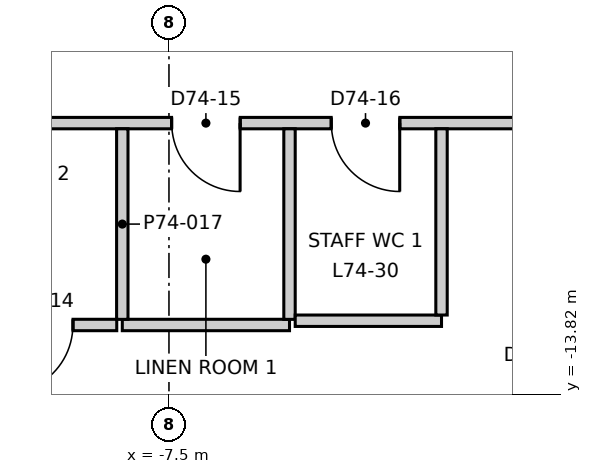
"""IFC4 building model, lengths in metres.
Left out: names, types, materials, properties, quantities, classifications, styles, units other than length and angle.
Written with IfcOpenShell. Run it as: python <this file> out.ifc"""

import sys

from ifc_helpers import new_model, si_unit, direction, frame, frame_2d, origin, place, context, subcontext, project, spatial, rectangle, extrude, element, fill, save


model = new_model("IFC4")
c1 = context("Model", 3, precision=1e-05, world=origin(), true_north=direction((0.0, 1.0)))
c2 = subcontext(c1, "Body", "Model", "MODEL_VIEW")
j1 = project(units=[si_unit("LENGTHUNIT", "METRE"), si_unit("PLANEANGLEUNIT", "RADIAN")], contexts=[c1])
p1 = place(None, origin())
s1 = spatial("IfcSite", under=j1, at=p1, CompositionType="ELEMENT")
p2 = place(p1, origin())
s2 = spatial("IfcBuilding", under=s1, at=p2, CompositionType="ELEMENT")
p3 = place(p2, frame((0.0, 0.0, 311.5)))
s3 = spatial("IfcBuildingStorey", under=s2, at=p3, CompositionType="ELEMENT", Elevation=311.5)
p4 = place(p3, frame((-2.412, 26.948, 0.0), z_axis=(0.0, 0.0, 1.0), x_axis=(-0.500002044679, -0.866024223285, 0.0)))
e1 = element("IfcWall", 1, at=p4, inside=s3, PredefinedType="ELEMENTEDWALL", context=c2, shape_type="SweptSolid", body=[
    extrude(rectangle(XDim=44.243, YDim=0.2, at=frame_2d((22.122, 0.0))), origin(), (0.0, 0.0, 1.0), 3.3),
])
p5 = place(p4, frame((2.056, 0.0, 0.9)))
e2 = element("IfcOpeningElement", 2, at=p5, cuts=e1, PredefinedType="OPENING", context=c2, shape_type="SweptSolid", body=[
    extrude(rectangle(XDim=3.7, YDim=2.2, at=frame_2d((1.85, 1.1))), frame((0.0, 0.11, 0.0), z_axis=(0.0, -1.0, 0.0), x_axis=(1.0, 0.0, 0.0)), (0.0, 0.0, 1.0), 0.22),
])
p6 = place(p4, frame((7.263, 0.0, 0.9)))
e3 = element("IfcOpeningElement", 3, at=p6, cuts=e1, PredefinedType="OPENING", context=c2, shape_type="SweptSolid", body=[
    extrude(rectangle(XDim=3.7, YDim=2.2, at=frame_2d((1.85, 1.1))), frame((0.0, 0.11, 0.0), z_axis=(0.0, -1.0, 0.0), x_axis=(1.0, 0.0, 0.0)), (0.0, 0.0, 1.0), 0.22),
])
p7 = place(p4, frame((12.471, 0.0, 0.9)))
e4 = element("IfcOpeningElement", 4, at=p7, cuts=e1, PredefinedType="OPENING", context=c2, shape_type="SweptSolid", body=[
    extrude(rectangle(XDim=3.7, YDim=2.2, at=frame_2d((1.85, 1.1))), frame((0.0, 0.11, 0.0), z_axis=(0.0, -1.0, 0.0), x_axis=(1.0, 0.0, 0.0)), (0.0, 0.0, 1.0), 0.22),
])
p8 = place(p4, frame((17.678, 0.0, 0.9)))
e5 = element("IfcOpeningElement", 5, at=p8, cuts=e1, PredefinedType="OPENING", context=c2, shape_type="SweptSolid", body=[
    extrude(rectangle(XDim=3.7, YDim=2.2, at=frame_2d((1.85, 1.1))), frame((0.0, 0.11, 0.0), z_axis=(0.0, -1.0, 0.0), x_axis=(1.0, 0.0, 0.0)), (0.0, 0.0, 1.0), 0.22),
])
p9 = place(p4, frame((22.885, 0.0, 0.9)))
e6 = element("IfcOpeningElement", 6, at=p9, cuts=e1, PredefinedType="OPENING", context=c2, shape_type="SweptSolid", body=[
    extrude(rectangle(XDim=3.7, YDim=2.2, at=frame_2d((1.85, 1.1))), frame((0.0, 0.11, 0.0), z_axis=(0.0, -1.0, 0.0), x_axis=(1.0, 0.0, 0.0)), (0.0, 0.0, 1.0), 0.22),
])
p10 = place(p4, frame((28.092, 0.0, 0.9)))
e7 = element("IfcOpeningElement", 7, at=p10, cuts=e1, PredefinedType="OPENING", context=c2, shape_type="SweptSolid", body=[
    extrude(rectangle(XDim=3.7, YDim=2.2, at=frame_2d((1.85, 1.1))), frame((0.0, 0.11, 0.0), z_axis=(0.0, -1.0, 0.0), x_axis=(1.0, 0.0, 0.0)), (0.0, 0.0, 1.0), 0.22),
])
p11 = place(p4, frame((33.3, 0.0, 0.9)))
e8 = element("IfcOpeningElement", 8, at=p11, cuts=e1, PredefinedType="OPENING", context=c2, shape_type="SweptSolid", body=[
    extrude(rectangle(XDim=3.7, YDim=2.2, at=frame_2d((1.85, 1.1))), frame((0.0, 0.11, 0.0), z_axis=(0.0, -1.0, 0.0), x_axis=(1.0, 0.0, 0.0)), (0.0, 0.0, 1.0), 0.22),
])
p12 = place(p4, frame((38.507, 0.0, 0.9)))
e9 = element("IfcOpeningElement", 9, at=p12, cuts=e1, PredefinedType="OPENING", context=c2, shape_type="SweptSolid", body=[
    extrude(rectangle(XDim=3.7, YDim=2.2, at=frame_2d((1.85, 1.1))), frame((0.0, 0.11, 0.0), z_axis=(0.0, -1.0, 0.0), x_axis=(1.0, 0.0, 0.0)), (0.0, 0.0, 1.0), 0.22),
])
p13 = place(p3, frame((-17.678, -10.12, 0.0), z_axis=(0.0, 0.0, 1.0), x_axis=(0.49998824015, 0.86603219323, 0.0)))
e10 = element("IfcWall", 10, at=p13, inside=s3, PredefinedType="PARTITIONING", context=c2, shape_type="SweptSolid", body=[
    extrude(rectangle(XDim=35.357, YDim=0.15, at=frame_2d((17.678, 0.0))), origin(), (0.0, 0.0, 1.0), 3.3),
])
p14 = place(p13, frame((28.607, 0.0, 0.0)))
e11 = element("IfcOpeningElement", 11, at=p14, cuts=e10, PredefinedType="OPENING", context=c2, shape_type="SweptSolid", body=[
    extrude(rectangle(XDim=1.0, YDim=2.1, at=frame_2d((0.5, 1.05))), frame((0.0, 0.085, 0.0), z_axis=(0.0, -1.0, 0.0), x_axis=(1.0, 0.0, 0.0)), (0.0, 0.0, 1.0), 0.17),
])
p15 = place(p13, frame((13.86, 0.0, 0.0)))
e12 = element("IfcOpeningElement", 12, at=p15, cuts=e10, PredefinedType="OPENING", context=c2, shape_type="SweptSolid", body=[
    extrude(rectangle(XDim=1.0, YDim=2.1, at=frame_2d((0.5, 1.05))), frame((0.0, 0.085, 0.0), z_axis=(0.0, -1.0, 0.0), x_axis=(1.0, 0.0, 0.0)), (0.0, 0.0, 1.0), 0.17),
])
p16 = place(p13, frame((18.96, 0.0, 0.0)))
e13 = element("IfcOpeningElement", 13, at=p16, cuts=e10, PredefinedType="OPENING", context=c2, shape_type="SweptSolid", body=[
    extrude(rectangle(XDim=0.9, YDim=2.1, at=frame_2d((0.45, 1.05))), frame((0.0, 0.085, 0.0), z_axis=(0.0, -1.0, 0.0), x_axis=(1.0, 0.0, 0.0)), (0.0, 0.0, 1.0), 0.17),
])
p17 = place(p13, frame((16.86, 0.0, 0.0)))
e14 = element("IfcOpeningElement", 14, at=p17, cuts=e10, PredefinedType="OPENING", context=c2, shape_type="SweptSolid", body=[
    extrude(rectangle(XDim=0.9, YDim=2.1, at=frame_2d((0.45, 1.05))), frame((0.0, 0.085, 0.0), z_axis=(0.0, -1.0, 0.0), x_axis=(1.0, 0.0, 0.0)), (0.0, 0.0, 1.0), 0.17),
])
p18 = place(p13, frame((8.146, 0.0, 0.0)))
e15 = element("IfcOpeningElement", 15, at=p18, cuts=e10, PredefinedType="OPENING", context=c2, shape_type="SweptSolid", body=[
    extrude(rectangle(XDim=1.0, YDim=2.1, at=frame_2d((0.5, 1.05))), frame((0.0, 0.085, 0.0), z_axis=(0.0, -1.0, 0.0), x_axis=(1.0, 0.0, 0.0)), (0.0, 0.0, 1.0), 0.17),
])
p19 = place(p13, frame((3.038, 0.0, 0.0)))
e16 = element("IfcOpeningElement", 16, at=p19, cuts=e10, PredefinedType="OPENING", context=c2, shape_type="SweptSolid", body=[
    extrude(rectangle(XDim=1.0, YDim=2.1, at=frame_2d((0.5, 1.05))), frame((0.0, 0.085, 0.0), z_axis=(0.0, -1.0, 0.0), x_axis=(1.0, 0.0, 0.0)), (0.0, 0.0, 1.0), 0.17),
])
p20 = place(p3, frame((-17.604, -10.25, 0.0), z_axis=(0.0, 0.0, 1.0), x_axis=(1.0, 0.0, 0.0)))
e17 = element("IfcWall", 17, at=p20, inside=s3, PredefinedType="PARTITIONING", context=c2, shape_type="SweptSolid", body=[
    extrude(rectangle(XDim=35.358, YDim=0.15, at=frame_2d((17.679, 0.0))), origin(), (0.0, 0.0, 1.0), 3.3),
])
p21 = place(p20, frame((3.0, 0.0, 0.0)))
e18 = element("IfcOpeningElement", 18, at=p21, cuts=e17, PredefinedType="OPENING", context=c2, shape_type="SweptSolid", body=[
    extrude(rectangle(XDim=1.0, YDim=2.1, at=frame_2d((0.5, 1.05))), frame((0.0, 0.085, 0.0), z_axis=(0.0, -1.0, 0.0), x_axis=(1.0, 0.0, 0.0)), (0.0, 0.0, 1.0), 0.17),
])
p22 = place(p20, frame((15.14, 0.0, 0.0)))
e19 = element("IfcOpeningElement", 19, at=p22, cuts=e17, PredefinedType="OPENING", context=c2, shape_type="SweptSolid", body=[
    extrude(rectangle(XDim=1.0, YDim=2.1, at=frame_2d((0.5, 1.05))), frame((0.0, 0.085, 0.0), z_axis=(0.0, -1.0, 0.0), x_axis=(1.0, 0.0, 0.0)), (0.0, 0.0, 1.0), 0.17),
])
p23 = place(p20, frame((10.14, 0.0, 0.0)))
e20 = element("IfcOpeningElement", 20, at=p23, cuts=e17, PredefinedType="OPENING", context=c2, shape_type="SweptSolid", body=[
    extrude(rectangle(XDim=0.9, YDim=2.1, at=frame_2d((0.45, 1.05))), frame((0.0, 0.085, 0.0), z_axis=(0.0, -1.0, 0.0), x_axis=(1.0, 0.0, 0.0)), (0.0, 0.0, 1.0), 0.17),
])
p24 = place(p20, frame((12.24, 0.0, 0.0)))
e21 = element("IfcOpeningElement", 21, at=p24, cuts=e17, PredefinedType="OPENING", context=c2, shape_type="SweptSolid", body=[
    extrude(rectangle(XDim=0.9, YDim=2.1, at=frame_2d((0.45, 1.05))), frame((0.0, 0.085, 0.0), z_axis=(0.0, -1.0, 0.0), x_axis=(1.0, 0.0, 0.0)), (0.0, 0.0, 1.0), 0.17),
])
p25 = place(p20, frame((25.654, 0.0, 0.0)))
e22 = element("IfcOpeningElement", 22, at=p25, cuts=e17, PredefinedType="OPENING", context=c2, shape_type="SweptSolid", body=[
    extrude(rectangle(XDim=1.0, YDim=2.1, at=frame_2d((0.5, 1.05))), frame((0.0, 0.085, 0.0), z_axis=(0.0, -1.0, 0.0), x_axis=(1.0, 0.0, 0.0)), (0.0, 0.0, 1.0), 0.17),
])
p26 = place(p20, frame((20.554, 0.0, 0.0)))
e23 = element("IfcOpeningElement", 23, at=p26, cuts=e17, PredefinedType="OPENING", context=c2, shape_type="SweptSolid", body=[
    extrude(rectangle(XDim=0.9, YDim=2.1, at=frame_2d((0.45, 1.05))), frame((0.0, 0.085, 0.0), z_axis=(0.0, -1.0, 0.0), x_axis=(1.0, 0.0, 0.0)), (0.0, 0.0, 1.0), 0.17),
])
p27 = place(p20, frame((22.754, 0.0, 0.0)))
e24 = element("IfcOpeningElement", 24, at=p27, cuts=e17, PredefinedType="OPENING", context=c2, shape_type="SweptSolid", body=[
    extrude(rectangle(XDim=0.9, YDim=2.1, at=frame_2d((0.45, 1.05))), frame((0.0, 0.085, 0.0), z_axis=(0.0, -1.0, 0.0), x_axis=(1.0, 0.0, 0.0)), (0.0, 0.0, 1.0), 0.17),
])
p28 = place(p20, frame((31.168, 0.0, 0.0)))
e25 = element("IfcOpeningElement", 25, at=p28, cuts=e17, PredefinedType="OPENING", context=c2, shape_type="SweptSolid", body=[
    extrude(rectangle(XDim=1.0, YDim=2.1, at=frame_2d((0.5, 1.05))), frame((0.0, 0.085, 0.0), z_axis=(0.0, -1.0, 0.0), x_axis=(1.0, 0.0, 0.0)), (0.0, 0.0, 1.0), 0.17),
])
p29 = place(p3, frame((-8.114, -12.906, 0.0), z_axis=(0.0, 0.0, 1.0), x_axis=(1.0, 0.0, 0.0)))
e26 = element("IfcWall", 26, at=p29, inside=s3, PredefinedType="PARTITIONING", context=c2, shape_type="SweptSolid", body=[
    extrude(rectangle(XDim=2.2, YDim=0.15, at=frame_2d((1.1, 0.0))), origin(), (0.0, 0.0, 1.0), 3.3),
])
for number, where, z_axis, x_axis in (
    (27, (-5.914, -12.832, 0.0), (0.0, 0.0, 1.0), (0.0, 1.0, 0.0)),
    (28, (-8.114, -12.832, 0.0), (0.0, 0.0, 1.0), (0.0, 1.0, 0.0)),
):
    element("IfcWall", number, at=place(p3, frame(where, z_axis=z_axis, x_axis=x_axis)), inside=s3, PredefinedType="PARTITIONING", context=c2, shape_type="SweptSolid", body=[
        extrude(rectangle(XDim=2.507, YDim=0.15, at=frame_2d((1.253, 0.0))), origin(), (0.0, 0.0, 1.0), 3.3),
    ])
p30 = place(p3, frame((-5.839, -12.85, 0.0), z_axis=(0.0, 0.0, 1.0), x_axis=(1.0, 0.0, 0.0)))
e29 = element("IfcWall", 29, at=p30, inside=s3, PredefinedType="PARTITIONING", context=c2, shape_type="SweptSolid", body=[
    extrude(rectangle(XDim=1.925, YDim=0.15, at=frame_2d((0.962, 0.0))), origin(), (0.0, 0.0, 1.0), 3.3),
])
p31 = place(p3, frame((-3.914, -12.775, 0.0), z_axis=(0.0, 0.0, 1.0), x_axis=(0.0, 1.0, 0.0)))
e30 = element("IfcWall", 30, at=p31, inside=s3, PredefinedType="PARTITIONING", context=c2, shape_type="SweptSolid", body=[
    extrude(rectangle(XDim=2.45, YDim=0.15, at=frame_2d((1.225, 0.0))), origin(), (0.0, 0.0, 1.0), 3.3),
])
p32 = place(p3, frame((-10.339, -12.906, 0.0), z_axis=(0.0, 0.0, 1.0), x_axis=(1.0, 0.0, 0.0)))
e31 = element("IfcWall", 31, at=p32, inside=s3, PredefinedType="PARTITIONING", context=c2, shape_type="SweptSolid", body=[
    extrude(rectangle(XDim=2.152, YDim=0.15, at=frame_2d((1.076, 0.0))), origin(), (0.0, 0.0, 1.0), 3.3),
])
p33 = place(p32, frame((0.675, 0.0, 0.0)))
e32 = element("IfcOpeningElement", 32, at=p33, cuts=e31, PredefinedType="OPENING", context=c2, shape_type="SweptSolid", body=[
    extrude(rectangle(XDim=0.9, YDim=2.1, at=frame_2d((0.45, 1.05))), frame((0.0, 0.085, 0.0), z_axis=(0.0, -1.0, 0.0), x_axis=(1.0, 0.0, 0.0)), (0.0, 0.0, 1.0), 0.17),
])
p34 = place(p33, origin())
e33 = element("IfcDoor", 33, at=p34, inside=s3, OperationType="SINGLE_SWING_LEFT", PredefinedType="DOOR", context=c2, shape_type="SweptSolid", body=[
    extrude(rectangle(XDim=0.9, YDim=2.1, at=frame_2d((0.45, 1.05))), frame((0.0, 0.025, 0.0), z_axis=(0.0, -1.0, 0.0), x_axis=(1.0, 0.0, 0.0)), (0.0, 0.0, 1.0), 0.05),
])
fill(e32, e33)
p35 = place(p23, origin())
e34 = element("IfcDoor", 34, at=p35, inside=s3, OperationType="SINGLE_SWING_RIGHT", PredefinedType="DOOR", context=c2, shape_type="SweptSolid", body=[
    extrude(rectangle(XDim=0.9, YDim=2.1, at=frame_2d((0.45, 1.05))), frame((0.0, 0.025, 0.0), z_axis=(0.0, -1.0, 0.0), x_axis=(1.0, 0.0, 0.0)), (0.0, 0.0, 1.0), 0.05),
])
fill(e20, e34)
p36 = place(p24, origin())
e35 = element("IfcDoor", 35, at=p36, inside=s3, OperationType="SINGLE_SWING_RIGHT", PredefinedType="DOOR", context=c2, shape_type="SweptSolid", body=[
    extrude(rectangle(XDim=0.9, YDim=2.1, at=frame_2d((0.45, 1.05))), frame((0.0, 0.025, 0.0), z_axis=(0.0, -1.0, 0.0), x_axis=(1.0, 0.0, 0.0)), (0.0, 0.0, 1.0), 0.05),
])
fill(e21, e35)
save(model, sys.argv[1])
